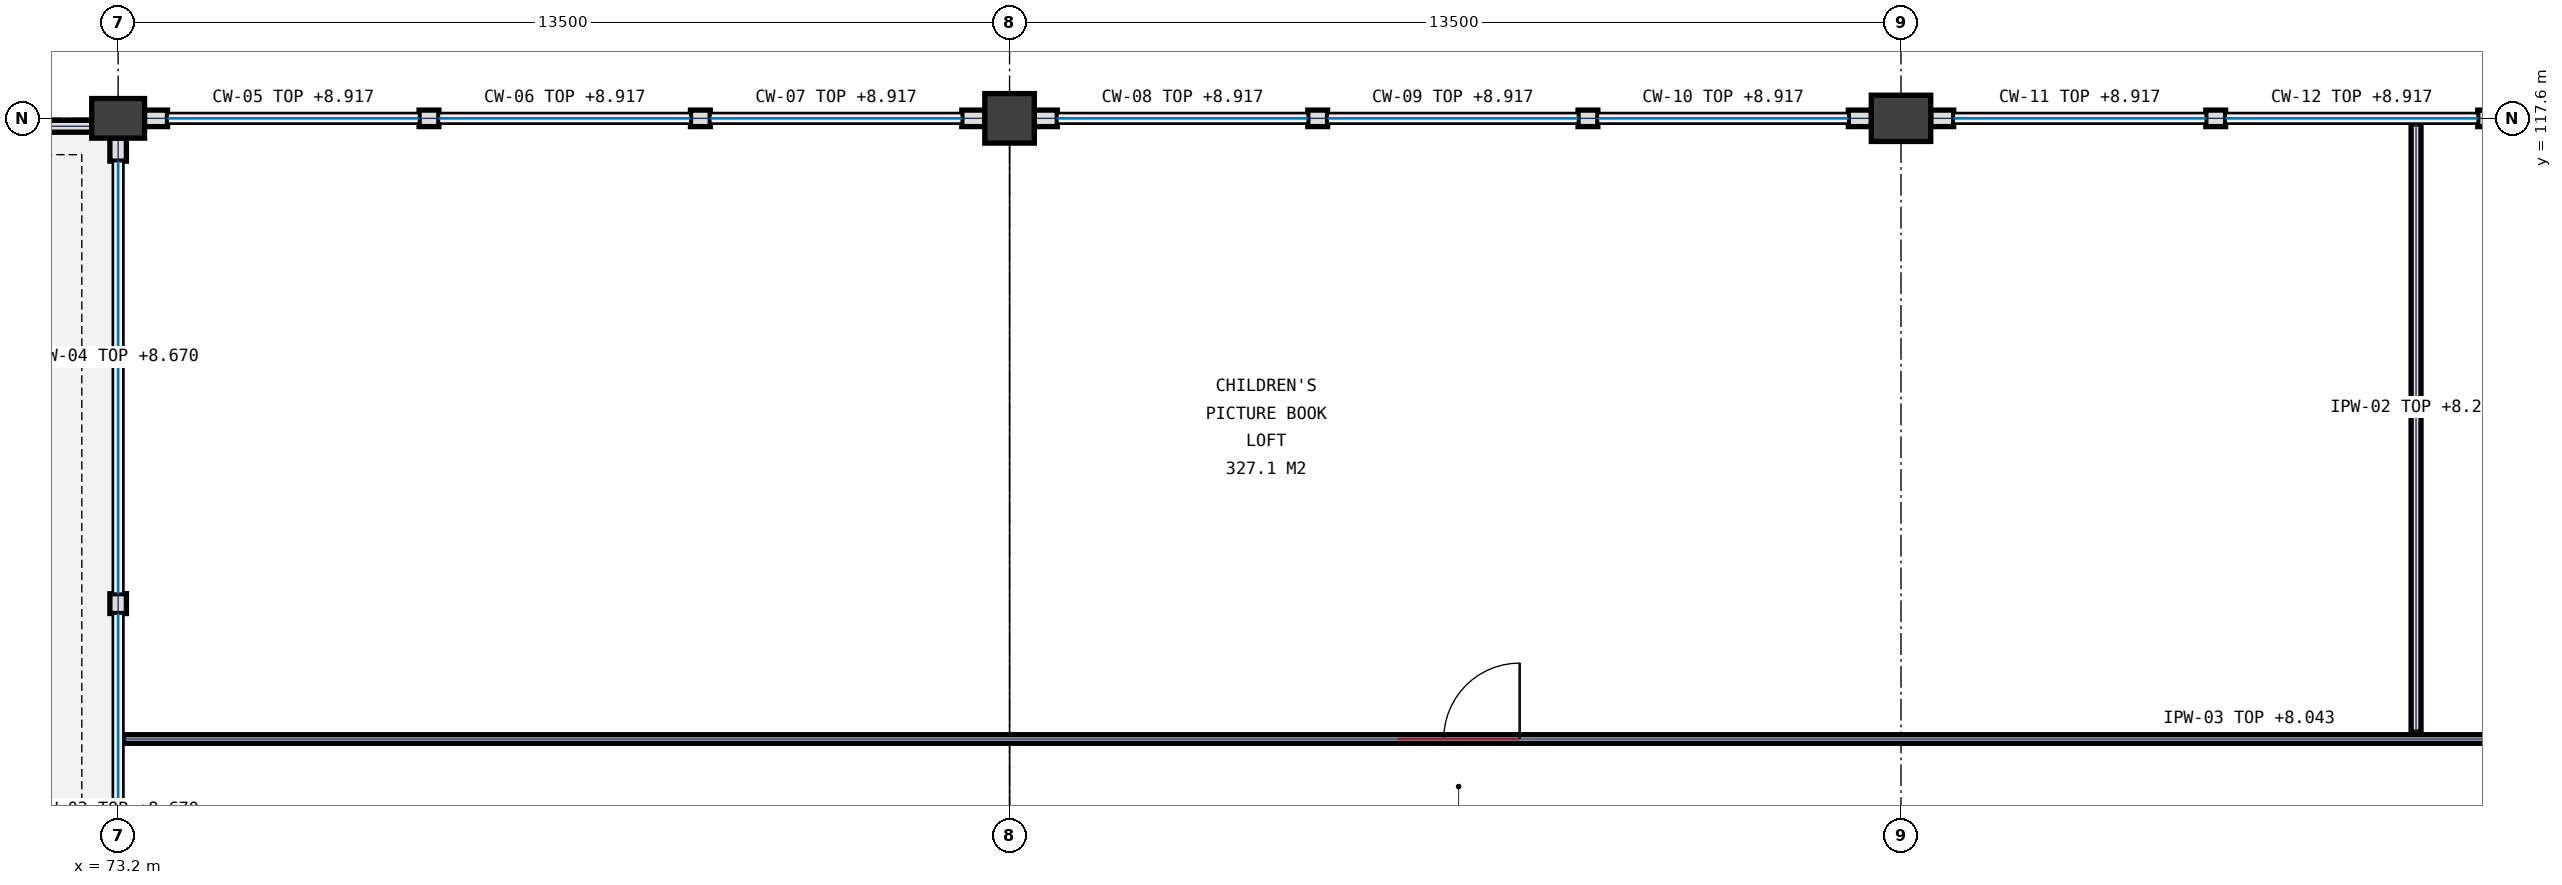
"""IFC4 building model, lengths in metres.
Left out: names, types, materials, properties, quantities, classifications, styles, units other than length and angle.
Written with IfcOpenShell. Run it as: python <this file> out.ifc"""

import sys

from ifc_helpers import new_model, si_unit, direction, frame, frame_2d, origin, origin_2d, place, context, subcontext, project, spatial, rectangle, extrude, element, fill, save


model = new_model("IFC4")
c1 = context("Model", 3, precision=1e-05, world=origin(), true_north=direction((0.0, 1.0)))
c2 = subcontext(c1, "Body", "Model", "MODEL_VIEW")
j1 = project(units=[si_unit("LENGTHUNIT", "METRE"), si_unit("PLANEANGLEUNIT", "RADIAN")], contexts=[c1])
p1 = place(None, origin())
s1 = spatial("IfcSite", under=j1, at=p1, CompositionType="ELEMENT")
p2 = place(p1, origin())
s2 = spatial("IfcBuilding", under=s1, at=p2, CompositionType="ELEMENT")
p3 = place(p2, frame((0.0, 0.0, 5.4)))
s3 = spatial("IfcBuildingStorey", under=s2, at=p3, CompositionType="ELEMENT", Elevation=5.4)
p4 = place(p3, frame((73.2, 117.6, 0.0), z_axis=(0.0, 0.0, 1.0), x_axis=(1.0, 0.0, 0.0)))
e1 = element("IfcColumn", 1, at=p4, inside=s3, PredefinedType="COLUMN", context=c2, shape_type="SweptSolid", body=[
    extrude(rectangle(XDim=0.8, YDim=0.6, at=origin_2d()), origin(), (0.0, 0.0, 1.0), 4.5),
])
p5 = place(p3, frame((86.7, 117.6, 0.0), z_axis=(0.0, 0.0, 1.0), x_axis=(1.0, 0.0, 0.0)))
e2 = element("IfcColumn", 2, at=p5, inside=s3, PredefinedType="COLUMN", context=c2, shape_type="SweptSolid", body=[
    extrude(rectangle(XDim=0.75, YDim=0.75, at=origin_2d()), origin(), (0.0, 0.0, 1.0), 4.5),
])
p6 = place(p3, frame((100.2, 117.6, 0.0), z_axis=(0.0, 0.0, 1.0), x_axis=(1.0, 0.0, 0.0)))
e3 = element("IfcColumn", 3, at=p6, inside=s3, PredefinedType="COLUMN", context=c2, shape_type="SweptSolid", body=[
    extrude(rectangle(XDim=0.9, YDim=0.7, at=origin_2d()), origin(), (0.0, 0.0, 1.0), 4.5),
])
p7 = place(p3, frame((73.2, 116.952, 0.0), z_axis=(0.0, 0.0, 1.0), x_axis=(0.0, 1.0, 0.0)))
e4 = element("IfcWall", 4, at=p7, inside=s3, PredefinedType="SOLIDWALL", context=c2, shape_type="SweptSolid", body=[
    extrude(rectangle(XDim=0.35, YDim=0.25, at=frame_2d((0.175, 0.0))), origin(), (0.0, 0.0, 1.0), 3.27),
])
p8 = place(p3, frame((73.2, 110.101, 0.0), z_axis=(0.0, 0.0, 1.0), x_axis=(0.0, 1.0, 0.0)))
e5 = element("IfcWall", 5, at=p8, inside=s3, PredefinedType="SOLIDWALL", context=c2, shape_type="SweptSolid", body=[
    extrude(rectangle(XDim=0.3, YDim=0.25, at=frame_2d((0.15, 0.0))), origin(), (0.0, 0.0, 1.0), 3.27),
])
p9 = place(p3, frame((73.598, 117.6, 0.0), z_axis=(0.0, 0.0, 1.0), x_axis=(1.0, 0.0, 0.0)))
e6 = element("IfcWall", 6, at=p9, inside=s3, PredefinedType="SOLIDWALL", context=c2, shape_type="SweptSolid", body=[
    extrude(rectangle(XDim=0.35, YDim=0.25, at=frame_2d((0.175, 0.0))), origin(), (0.0, 0.0, 1.0), 3.517),
])
p10 = place(p3, frame((85.977, 117.6, 0.0), z_axis=(0.0, 0.0, 1.0), x_axis=(1.0, 0.0, 0.0)))
e7 = element("IfcWall", 7, at=p10, inside=s3, PredefinedType="SOLIDWALL", context=c2, shape_type="SweptSolid", body=[
    extrude(rectangle(XDim=0.35, YDim=0.25, at=frame_2d((0.175, 0.0))), origin(), (0.0, 0.0, 1.0), 3.517),
])
p11 = place(p3, frame((77.758, 117.6, 0.0), z_axis=(0.0, 0.0, 1.0), x_axis=(1.0, 0.0, 0.0)))
e8 = element("IfcWall", 8, at=p11, inside=s3, PredefinedType="SOLIDWALL", context=c2, shape_type="SweptSolid", body=[
    extrude(rectangle(XDim=0.3, YDim=0.25, at=frame_2d((0.15, 0.0))), origin(), (0.0, 0.0, 1.0), 3.517),
])
p12 = place(p3, frame((81.867, 117.6, 0.0), z_axis=(0.0, 0.0, 1.0), x_axis=(1.0, 0.0, 0.0)))
e9 = element("IfcWall", 9, at=p12, inside=s3, PredefinedType="SOLIDWALL", context=c2, shape_type="SweptSolid", body=[
    extrude(rectangle(XDim=0.3, YDim=0.25, at=frame_2d((0.15, 0.0))), origin(), (0.0, 0.0, 1.0), 3.517),
])
p13 = place(p3, frame((87.073, 117.6, 0.0), z_axis=(0.0, 0.0, 1.0), x_axis=(1.0, 0.0, 0.0)))
e10 = element("IfcWall", 10, at=p13, inside=s3, PredefinedType="SOLIDWALL", context=c2, shape_type="SweptSolid", body=[
    extrude(rectangle(XDim=0.35, YDim=0.25, at=frame_2d((0.175, 0.0))), origin(), (0.0, 0.0, 1.0), 3.517),
])
p14 = place(p3, frame((99.402, 117.6, 0.0), z_axis=(0.0, 0.0, 1.0), x_axis=(1.0, 0.0, 0.0)))
e11 = element("IfcWall", 11, at=p14, inside=s3, PredefinedType="SOLIDWALL", context=c2, shape_type="SweptSolid", body=[
    extrude(rectangle(XDim=0.35, YDim=0.25, at=frame_2d((0.175, 0.0))), origin(), (0.0, 0.0, 1.0), 3.517),
])
p15 = place(p3, frame((91.216, 117.6, 0.0), z_axis=(0.0, 0.0, 1.0), x_axis=(1.0, 0.0, 0.0)))
e12 = element("IfcWall", 12, at=p15, inside=s3, PredefinedType="SOLIDWALL", context=c2, shape_type="SweptSolid", body=[
    extrude(rectangle(XDim=0.3, YDim=0.25, at=frame_2d((0.15, 0.0))), origin(), (0.0, 0.0, 1.0), 3.517),
])
p16 = place(p3, frame((95.309, 117.6, 0.0), z_axis=(0.0, 0.0, 1.0), x_axis=(1.0, 0.0, 0.0)))
e13 = element("IfcWall", 13, at=p16, inside=s3, PredefinedType="SOLIDWALL", context=c2, shape_type="SweptSolid", body=[
    extrude(rectangle(XDim=0.3, YDim=0.25, at=frame_2d((0.15, 0.0))), origin(), (0.0, 0.0, 1.0), 3.517),
])
p17 = place(p3, frame((100.648, 117.6, 0.0), z_axis=(0.0, 0.0, 1.0), x_axis=(1.0, 0.0, 0.0)))
e14 = element("IfcWall", 14, at=p17, inside=s3, PredefinedType="SOLIDWALL", context=c2, shape_type="SweptSolid", body=[
    extrude(rectangle(XDim=0.35, YDim=0.25, at=frame_2d((0.175, 0.0))), origin(), (0.0, 0.0, 1.0), 3.517),
])
p18 = place(p3, frame((104.816, 117.6, 0.0), z_axis=(0.0, 0.0, 1.0), x_axis=(1.0, 0.0, 0.0)))
e15 = element("IfcWall", 15, at=p18, inside=s3, PredefinedType="SOLIDWALL", context=c2, shape_type="SweptSolid", body=[
    extrude(rectangle(XDim=0.3, YDim=0.25, at=frame_2d((0.15, 0.0))), origin(), (0.0, 0.0, 1.0), 3.517),
])
p19 = place(p3, frame((108.934, 117.6, 0.0), z_axis=(0.0, 0.0, 1.0), x_axis=(1.0, 0.0, 0.0)))
e16 = element("IfcWall", 16, at=p19, inside=s3, PredefinedType="SOLIDWALL", context=c2, shape_type="SweptSolid", body=[
    extrude(rectangle(XDim=0.3, YDim=0.25, at=frame_2d((0.15, 0.0))), origin(), (0.0, 0.0, 1.0), 3.517),
])
p20 = place(p3, frame((60.0, 117.48, 0.0), z_axis=(0.0, 0.0, 1.0), x_axis=(1.0, 0.0, 0.0)))
e17 = element("IfcWall", 17, at=p20, inside=s3, PredefinedType="PARAPET", context=c2, shape_type="SweptSolid", body=[
    extrude(rectangle(XDim=12.9, YDim=0.18, at=frame_2d((6.45, 0.0))), origin(), (0.0, 0.0, 1.0), 1.15),
])
p21 = place(p3, frame((73.283, 108.2, 0.0), z_axis=(0.0, 0.0, 1.0), x_axis=(1.0, 0.0, 0.0)))
e18 = element("IfcWall", 18, at=p21, inside=s3, PredefinedType="PARTITIONING", context=c2, shape_type="SweptSolid", body=[
    extrude(rectangle(XDim=61.034, YDim=0.13, at=frame_2d((30.517, 0.0))), origin(), (0.0, 0.0, 1.0), 2.643),
])
p22 = place(p21, frame((19.292, 0.0, 0.0)))
e19 = element("IfcOpeningElement", 19, at=p22, cuts=e18, PredefinedType="OPENING", context=c2, shape_type="SweptSolid", body=[
    extrude(rectangle(XDim=1.85, YDim=2.35, at=frame_2d((0.925, 1.175))), frame((0.0, 0.075, 0.0), z_axis=(0.0, -1.0, 0.0), x_axis=(1.0, 0.0, 0.0)), (0.0, 0.0, 1.0), 0.15),
])
p23 = place(p21, frame((44.217, 0.0, 0.0)))
e20 = element("IfcOpeningElement", 20, at=p23, cuts=e18, PredefinedType="OPENING", context=c2, shape_type="SweptSolid", body=[
    extrude(rectangle(XDim=1.0, YDim=2.2, at=frame_2d((0.5, 1.1))), frame((0.0, 0.075, 0.0), z_axis=(0.0, -1.0, 0.0), x_axis=(1.0, 0.0, 0.0)), (0.0, 0.0, 1.0), 0.15),
])
p24 = place(p3, frame((108.0, 108.305, 0.0), z_axis=(0.0, 0.0, 1.0), x_axis=(0.0, 1.0, 0.0)))
e21 = element("IfcWall", 21, at=p24, inside=s3, PredefinedType="PARTITIONING", context=c2, shape_type="SweptSolid", body=[
    extrude(rectangle(XDim=9.212, YDim=0.15, at=frame_2d((4.606, 0.0))), origin(), (0.0, 0.0, 1.0), 2.89),
])
p25 = place(p22, origin())
e22 = element("IfcDoor", 22, at=p25, inside=s3, OperationType="SINGLE_SWING_RIGHT", PredefinedType="DOOR", context=c2, shape_type="SweptSolid", body=[
    extrude(rectangle(XDim=1.85, YDim=2.35, at=frame_2d((0.925, 1.175))), frame((0.0, 0.032, 0.0), z_axis=(0.0, -1.0, 0.0), x_axis=(1.0, 0.0, 0.0)), (0.0, 0.0, 1.0), 0.065),
])
fill(e19, e22)
save(model, sys.argv[1])
